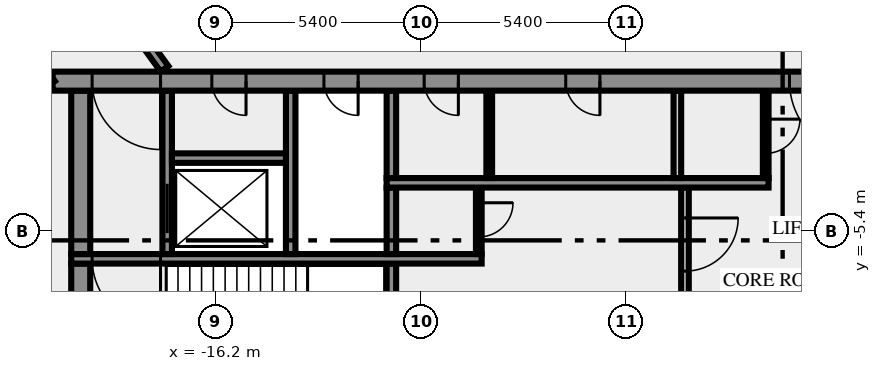
"""IFC4 building model, lengths in metres.
Left out: names, types, materials, properties, quantities, classifications, styles, units other than length and angle.
Written with IfcOpenShell. Run it as: python <this file> out.ifc"""

import sys

from ifc_helpers import new_model, si_unit, direction, frame, frame_2d, origin, place, context, subcontext, project, spatial, rectangle, extrude, element, fill, save


model = new_model("IFC4")
c1 = context("Model", 3, precision=1e-05, world=origin(), true_north=direction((0.0, 1.0)))
c2 = subcontext(c1, "Body", "Model", "MODEL_VIEW")
j1 = project(units=[si_unit("LENGTHUNIT", "METRE"), si_unit("PLANEANGLEUNIT", "RADIAN")], contexts=[c1])
p1 = place(None, origin())
s1 = spatial("IfcSite", under=j1, at=p1, CompositionType="ELEMENT")
p2 = place(p1, origin())
s2 = spatial("IfcBuilding", under=s1, at=p2, CompositionType="ELEMENT")
p3 = place(p2, frame((0.0, 0.0, 194.0)))
s3 = spatial("IfcBuildingStorey", under=s2, at=p3, CompositionType="ELEMENT", Elevation=194.0)
p4 = place(p3, frame((-19.75, -10.5, 0.0), z_axis=(0.0, 0.0, 1.0), x_axis=(0.0, 1.0, 0.0)))
e1 = element("IfcWall", 1, at=p4, inside=s3, PredefinedType="SHEAR", context=c2, shape_type="SweptSolid", body=[
    extrude(rectangle(XDim=4.25, YDim=0.5, at=frame_2d((2.125, 0.0))), origin(), (0.0, 0.0, 1.0), 3.65),
])
p5 = place(p3, frame((-11.575, -7.25, 0.0), z_axis=(0.0, 0.0, 1.0), x_axis=(0.0, 1.0, 0.0)))
e2 = element("IfcWall", 2, at=p5, inside=s3, PredefinedType="SHEAR", context=c2, shape_type="SweptSolid", body=[
    extrude(rectangle(XDim=1.0, YDim=0.25, at=frame_2d((0.5, 0.0))), origin(), (0.0, 0.0, 1.0), 3.65),
])
p6 = place(p3, frame((-3.85, -4.25, 0.0), z_axis=(0.0, 0.0, 1.0), x_axis=(0.0, -1.0, 0.0)))
e3 = element("IfcWall", 3, at=p6, inside=s3, PredefinedType="SOLIDWALL", context=c2, shape_type="SweptSolid", body=[
    extrude(rectangle(XDim=3.0, YDim=0.2, at=frame_2d((1.5, 0.0))), origin(), (0.0, 0.0, 1.0), 3.65),
])
p7 = place(p6, frame((0.8, 0.0, 0.0)))
e4 = element("IfcOpeningElement", 4, at=p7, cuts=e3, PredefinedType="OPENING", context=c2, shape_type="SweptSolid", body=[
    extrude(rectangle(XDim=1.4, YDim=2.1, at=frame_2d((0.7, 1.05))), frame((0.0, 0.11, 0.0), z_axis=(0.0, -1.0, 0.0), x_axis=(1.0, 0.0, 0.0)), (0.0, 0.0, 1.0), 0.22),
])
p8 = place(p3, frame((-9.2, -6.125, 0.0), z_axis=(0.0, 0.0, 1.0), x_axis=(-1.0, 0.0, 0.0)))
e5 = element("IfcWall", 5, at=p8, inside=s3, PredefinedType="SHEAR", context=c2, shape_type="SweptSolid", body=[
    extrude(rectangle(XDim=10.8, YDim=0.25, at=frame_2d((5.4, 0.0))), origin(), (0.0, 0.0, 1.0), 3.65),
])
p9 = place(p8, frame((8.45, 0.0, 0.0)))
e6 = element("IfcOpeningElement", 6, at=p9, cuts=e5, PredefinedType="OPENING", context=c2, shape_type="SweptSolid", body=[
    extrude(rectangle(XDim=1.8, YDim=2.1, at=frame_2d((0.9, 1.05))), frame((0.0, 0.135, 0.0), z_axis=(0.0, -1.0, 0.0), x_axis=(1.0, 0.0, 0.0)), (0.0, 0.0, 1.0), 0.27),
])
p10 = place(p3, frame((-19.75, -6.0, 0.0), z_axis=(0.0, 0.0, 1.0), x_axis=(0.0, 1.0, 0.0)))
e7 = element("IfcWall", 7, at=p10, inside=s3, PredefinedType="SHEAR", context=c2, shape_type="SweptSolid", body=[
    extrude(rectangle(XDim=4.3, YDim=0.5, at=frame_2d((2.15, 0.0))), origin(), (0.0, 0.0, 1.0), 3.65),
])
p11 = place(p3, frame((-17.475, -6.0, 0.0), z_axis=(0.0, 0.0, 1.0), x_axis=(0.0, 1.0, 0.0)))
e8 = element("IfcWall", 8, at=p11, inside=s3, PredefinedType="SHEAR", context=c2, shape_type="SweptSolid", body=[
    extrude(rectangle(XDim=4.3, YDim=0.25, at=frame_2d((2.15, 0.0))), origin(), (0.0, 0.0, 1.0), 3.65),
])
p12 = place(p11, frame((0.55, 0.0, 0.0)))
e9 = element("IfcOpeningElement", 9, at=p12, cuts=e8, PredefinedType="OPENING", context=c2, shape_type="SweptSolid", body=[
    extrude(rectangle(XDim=1.3, YDim=2.1, at=frame_2d((0.65, 1.05))), frame((0.0, 0.135, 0.0), z_axis=(0.0, -1.0, 0.0), x_axis=(1.0, 0.0, 0.0)), (0.0, 0.0, 1.0), 0.27),
])
p13 = place(p3, frame((-14.225, -6.0, 0.0), z_axis=(0.0, 0.0, 1.0), x_axis=(0.0, 1.0, 0.0)))
e10 = element("IfcWall", 10, at=p13, inside=s3, PredefinedType="SHEAR", context=c2, shape_type="SweptSolid", body=[
    extrude(rectangle(XDim=4.3, YDim=0.25, at=frame_2d((2.15, 0.0))), origin(), (0.0, 0.0, 1.0), 3.65),
])
p14 = place(p3, frame((-11.575, -6.0, 0.0), z_axis=(0.0, 0.0, 1.0), x_axis=(0.0, 1.0, 0.0)))
e11 = element("IfcWall", 11, at=p14, inside=s3, PredefinedType="SHEAR", context=c2, shape_type="SweptSolid", body=[
    extrude(rectangle(XDim=1.75, YDim=0.25, at=frame_2d((0.875, 0.0))), origin(), (0.0, 0.0, 1.0), 3.65),
])
p15 = place(p3, frame((-9.275, -4.25, 0.0), z_axis=(0.0, 0.0, 1.0), x_axis=(0.0, -1.0, 0.0)))
e12 = element("IfcWall", 12, at=p15, inside=s3, PredefinedType="PARTITIONING", context=c2, shape_type="SweptSolid", body=[
    extrude(rectangle(XDim=1.75, YDim=0.15, at=frame_2d((0.875, 0.0))), origin(), (0.0, 0.0, 1.0), 3.65),
])
p16 = place(p15, frame((0.4, 0.0, 0.0)))
e13 = element("IfcOpeningElement", 13, at=p16, cuts=e12, PredefinedType="OPENING", context=c2, shape_type="SweptSolid", body=[
    extrude(rectangle(XDim=0.9, YDim=2.1, at=frame_2d((0.45, 1.05))), frame((0.0, 0.085, 0.0), z_axis=(0.0, -1.0, 0.0), x_axis=(1.0, 0.0, 0.0)), (0.0, 0.0, 1.0), 0.17),
])
p17 = place(p3, frame((-11.7, -4.125, 0.0), z_axis=(0.0, 0.0, 1.0), x_axis=(1.0, 0.0, 0.0)))
e14 = element("IfcWall", 14, at=p17, inside=s3, PredefinedType="SHEAR", context=c2, shape_type="SweptSolid", body=[
    extrude(rectangle(XDim=10.05, YDim=0.25, at=frame_2d((5.025, 0.0))), origin(), (0.0, 0.0, 1.0), 3.65),
])
p18 = place(p3, frame((-11.575, -4.0, 0.0), z_axis=(0.0, 0.0, 1.0), x_axis=(0.0, 1.0, 0.0)))
e15 = element("IfcWall", 15, at=p18, inside=s3, PredefinedType="SHEAR", context=c2, shape_type="SweptSolid", body=[
    extrude(rectangle(XDim=2.3, YDim=0.25, at=frame_2d((1.15, 0.0))), origin(), (0.0, 0.0, 1.0), 3.65),
])
p19 = place(p3, frame((-9.0, -4.0, 0.0), z_axis=(0.0, 0.0, 1.0), x_axis=(0.0, 1.0, 0.0)))
e16 = element("IfcWall", 16, at=p19, inside=s3, PredefinedType="PARTITIONING", context=c2, shape_type="SweptSolid", body=[
    extrude(rectangle(XDim=2.3, YDim=0.15, at=frame_2d((1.15, 0.0))), origin(), (0.0, 0.0, 1.0), 3.65),
])
p20 = place(p3, frame((-4.05, -4.0, 0.0), z_axis=(0.0, 0.0, 1.0), x_axis=(0.0, 1.0, 0.0)))
e17 = element("IfcWall", 17, at=p20, inside=s3, PredefinedType="SOLIDWALL", context=c2, shape_type="SweptSolid", body=[
    extrude(rectangle(XDim=2.3, YDim=0.2, at=frame_2d((1.15, 0.0))), origin(), (0.0, 0.0, 1.0), 3.65),
])
p21 = place(p3, frame((-1.725, -1.7, 0.0), z_axis=(0.0, 0.0, 1.0), x_axis=(0.0, -1.0, 0.0)))
e18 = element("IfcWall", 18, at=p21, inside=s3, PredefinedType="PARTITIONING", context=c2, shape_type="SweptSolid", body=[
    extrude(rectangle(XDim=2.3, YDim=0.15, at=frame_2d((1.15, 0.0))), origin(), (0.0, 0.0, 1.0), 3.65),
])
p22 = place(p21, frame((0.75, 0.0, 0.0)))
e19 = element("IfcOpeningElement", 19, at=p22, cuts=e18, PredefinedType="OPENING", context=c2, shape_type="SweptSolid", body=[
    extrude(rectangle(XDim=0.9, YDim=2.1, at=frame_2d((0.45, 1.05))), frame((0.0, 0.085, 0.0), z_axis=(0.0, -1.0, 0.0), x_axis=(1.0, 0.0, 0.0)), (0.0, 0.0, 1.0), 0.17),
])
p23 = place(p3, frame((-17.35, -3.475, 0.0), z_axis=(0.0, 0.0, 1.0), x_axis=(1.0, 0.0, 0.0)))
e20 = element("IfcWall", 20, at=p23, inside=s3, PredefinedType="SHEAR", context=c2, shape_type="SweptSolid", body=[
    extrude(rectangle(XDim=3.0, YDim=0.25, at=frame_2d((1.5, 0.0))), origin(), (0.0, 0.0, 1.0), 3.65),
])
p24 = place(p3, frame((20.49, -1.45, 0.0), z_axis=(0.0, 0.0, 1.0), x_axis=(-1.0, 0.0, 0.0)))
e21 = element("IfcWall", 21, at=p24, inside=s3, PredefinedType="SHEAR", context=c2, shape_type="SweptSolid", body=[
    extrude(rectangle(XDim=40.98, YDim=0.5, at=frame_2d((20.49, 0.0))), origin(), (0.0, 0.0, 1.0), 3.65),
])
p25 = place(p24, frame((38.14, 0.0, 0.0)))
e22 = element("IfcOpeningElement", 22, at=p25, cuts=e21, PredefinedType="OPENING", context=c2, shape_type="SweptSolid", body=[
    extrude(rectangle(XDim=1.8, YDim=2.1, at=frame_2d((0.9, 1.05))), frame((0.0, 0.26, 0.0), z_axis=(0.0, -1.0, 0.0), x_axis=(1.0, 0.0, 0.0)), (0.0, 0.0, 1.0), 0.52),
])
p26 = place(p24, frame((35.89, 0.0, 0.0)))
e23 = element("IfcOpeningElement", 23, at=p26, cuts=e21, PredefinedType="OPENING", context=c2, shape_type="SweptSolid", body=[
    extrude(rectangle(XDim=0.9, YDim=2.1, at=frame_2d((0.45, 1.05))), frame((0.0, 0.26, 0.0), z_axis=(0.0, -1.0, 0.0), x_axis=(1.0, 0.0, 0.0)), (0.0, 0.0, 1.0), 0.52),
])
p27 = place(p24, frame((32.94, 0.0, 0.0)))
e24 = element("IfcOpeningElement", 24, at=p27, cuts=e21, PredefinedType="OPENING", context=c2, shape_type="SweptSolid", body=[
    extrude(rectangle(XDim=0.9, YDim=2.1, at=frame_2d((0.45, 1.05))), frame((0.0, 0.26, 0.0), z_axis=(0.0, -1.0, 0.0), x_axis=(1.0, 0.0, 0.0)), (0.0, 0.0, 1.0), 0.52),
])
p28 = place(p24, frame((30.302, 0.0, 0.0)))
e25 = element("IfcOpeningElement", 25, at=p28, cuts=e21, PredefinedType="OPENING", context=c2, shape_type="SweptSolid", body=[
    extrude(rectangle(XDim=0.9, YDim=2.1, at=frame_2d((0.45, 1.05))), frame((0.0, 0.26, 0.0), z_axis=(0.0, -1.0, 0.0), x_axis=(1.0, 0.0, 0.0)), (0.0, 0.0, 1.0), 0.52),
])
p29 = place(p24, frame((26.577, 0.0, 0.0)))
e26 = element("IfcOpeningElement", 26, at=p29, cuts=e21, PredefinedType="OPENING", context=c2, shape_type="SweptSolid", body=[
    extrude(rectangle(XDim=0.9, YDim=2.1, at=frame_2d((0.45, 1.05))), frame((0.0, 0.26, 0.0), z_axis=(0.0, -1.0, 0.0), x_axis=(1.0, 0.0, 0.0)), (0.0, 0.0, 1.0), 0.52),
])
p30 = place(p24, frame((19.59, 0.0, 0.0)))
e27 = element("IfcOpeningElement", 27, at=p30, cuts=e21, PredefinedType="OPENING", context=c2, shape_type="SweptSolid", body=[
    extrude(rectangle(XDim=2.0, YDim=2.1, at=frame_2d((1.0, 1.05))), frame((0.0, 0.26, 0.0), z_axis=(0.0, -1.0, 0.0), x_axis=(1.0, 0.0, 0.0)), (0.0, 0.0, 1.0), 0.52),
])
p31 = place(p24, frame((7.14, 0.0, 0.0)))
e28 = element("IfcOpeningElement", 28, at=p31, cuts=e21, PredefinedType="OPENING", context=c2, shape_type="SweptSolid", body=[
    extrude(rectangle(XDim=0.9, YDim=2.1, at=frame_2d((0.45, 1.05))), frame((0.0, 0.26, 0.0), z_axis=(0.0, -1.0, 0.0), x_axis=(1.0, 0.0, 0.0)), (0.0, 0.0, 1.0), 0.52),
])
p32 = place(p24, frame((5.028, 0.0, 0.0)))
e29 = element("IfcOpeningElement", 29, at=p32, cuts=e21, PredefinedType="OPENING", context=c2, shape_type="SweptSolid", body=[
    extrude(rectangle(XDim=0.8, YDim=2.1, at=frame_2d((0.4, 1.05))), frame((0.0, 0.26, 0.0), z_axis=(0.0, -1.0, 0.0), x_axis=(1.0, 0.0, 0.0)), (0.0, 0.0, 1.0), 0.52),
])
p33 = place(p24, frame((3.452, 0.0, 0.0)))
e30 = element("IfcOpeningElement", 30, at=p33, cuts=e21, PredefinedType="OPENING", context=c2, shape_type="SweptSolid", body=[
    extrude(rectangle(XDim=0.8, YDim=2.1, at=frame_2d((0.4, 1.05))), frame((0.0, 0.26, 0.0), z_axis=(0.0, -1.0, 0.0), x_axis=(1.0, 0.0, 0.0)), (0.0, 0.0, 1.0), 0.52),
])
p34 = place(p24, frame((1.04, 0.0, 0.0)))
e31 = element("IfcOpeningElement", 31, at=p34, cuts=e21, PredefinedType="OPENING", context=c2, shape_type="SweptSolid", body=[
    extrude(rectangle(XDim=1.8, YDim=2.1, at=frame_2d((0.9, 1.05))), frame((0.0, 0.26, 0.0), z_axis=(0.0, -1.0, 0.0), x_axis=(1.0, 0.0, 0.0)), (0.0, 0.0, 1.0), 0.52),
])
p35 = place(p3, frame((-20.531, -1.523, 0.0), z_axis=(0.0, 0.0, 1.0), x_axis=(-0.587785812891, 0.809016587076, 0.0)))
e32 = element("IfcWall", 32, at=p35, inside=s3, PredefinedType="SOLIDWALL", context=c2, shape_type="SweptSolid", body=[
    extrude(rectangle(XDim=28.67, YDim=0.25, at=frame_2d((14.335, 0.0))), origin(), (0.0, 0.0, 1.0), 3.65),
])
p36 = place(p35, frame((17.015, 0.0, 0.0)))
e33 = element("IfcOpeningElement", 33, at=p36, cuts=e32, PredefinedType="OPENING", context=c2, shape_type="SweptSolid", body=[
    extrude(rectangle(XDim=0.9, YDim=2.1, at=frame_2d((0.45, 1.05))), frame((0.0, 0.135, 0.0), z_axis=(0.0, -1.0, 0.0), x_axis=(1.0, 0.0, 0.0)), (0.0, 0.0, 1.0), 0.27),
])
p37 = place(p35, frame((8.916, 0.0, 0.0)))
e34 = element("IfcOpeningElement", 34, at=p37, cuts=e32, PredefinedType="OPENING", context=c2, shape_type="SweptSolid", body=[
    extrude(rectangle(XDim=0.9, YDim=2.1, at=frame_2d((0.45, 1.05))), frame((0.0, 0.135, 0.0), z_axis=(0.0, -1.0, 0.0), x_axis=(1.0, 0.0, 0.0)), (0.0, 0.0, 1.0), 0.27),
])
p38 = place(p35, frame((18.616, 0.0, 0.0)))
e35 = element("IfcOpeningElement", 35, at=p38, cuts=e32, PredefinedType="OPENING", context=c2, shape_type="SweptSolid", body=[
    extrude(rectangle(XDim=0.9, YDim=2.1, at=frame_2d((0.45, 1.05))), frame((0.0, 0.135, 0.0), z_axis=(0.0, -1.0, 0.0), x_axis=(1.0, 0.0, 0.0)), (0.0, 0.0, 1.0), 0.27),
])
p39 = place(p35, frame((11.615, 0.0, 0.0)))
e36 = element("IfcOpeningElement", 36, at=p39, cuts=e32, PredefinedType="OPENING", context=c2, shape_type="SweptSolid", body=[
    extrude(rectangle(XDim=0.9, YDim=2.1, at=frame_2d((0.45, 1.05))), frame((0.0, 0.135, 0.0), z_axis=(0.0, -1.0, 0.0), x_axis=(1.0, 0.0, 0.0)), (0.0, 0.0, 1.0), 0.27),
])
p40 = place(p3, frame((-35.092, 23.027, 0.0), z_axis=(0.0, 0.0, 1.0), x_axis=(0.587784076945, -0.809017848313, 0.0)))
e37 = element("IfcWall", 37, at=p40, inside=s3, PredefinedType="SOLIDWALL", context=c2, shape_type="SweptSolid", body=[
    extrude(rectangle(XDim=29.853, YDim=0.25, at=frame_2d((14.927, 0.0))), origin(), (0.0, 0.0, 1.0), 3.65),
])
p41 = place(p40, frame((10.095, 0.0, 0.0)))
e38 = element("IfcOpeningElement", 38, at=p41, cuts=e37, PredefinedType="OPENING", context=c2, shape_type="SweptSolid", body=[
    extrude(rectangle(XDim=0.9, YDim=2.1, at=frame_2d((0.45, 1.05))), frame((0.0, 0.135, 0.0), z_axis=(0.0, -1.0, 0.0), x_axis=(1.0, 0.0, 0.0)), (0.0, 0.0, 1.0), 0.27),
])
p42 = place(p40, frame((15.495, 0.0, 0.0)))
e39 = element("IfcOpeningElement", 39, at=p42, cuts=e37, PredefinedType="OPENING", context=c2, shape_type="SweptSolid", body=[
    extrude(rectangle(XDim=0.9, YDim=2.1, at=frame_2d((0.45, 1.05))), frame((0.0, 0.135, 0.0), z_axis=(0.0, -1.0, 0.0), x_axis=(1.0, 0.0, 0.0)), (0.0, 0.0, 1.0), 0.27),
])
p43 = place(p40, frame((0.224, 0.0, 0.0)))
e40 = element("IfcOpeningElement", 40, at=p43, cuts=e37, PredefinedType="OPENING", context=c2, shape_type="SweptSolid", body=[
    extrude(rectangle(XDim=0.9, YDim=2.1, at=frame_2d((0.45, 1.05))), frame((0.0, 0.135, 0.0), z_axis=(0.0, -1.0, 0.0), x_axis=(1.0, 0.0, 0.0)), (0.0, 0.0, 1.0), 0.27),
])
p44 = place(p7, origin())
e41 = element("IfcDoor", 41, at=p44, inside=s3, OperationType="DOUBLE_DOOR_SINGLE_SWING", PredefinedType="DOOR", context=c2, shape_type="SweptSolid", body=[
    extrude(rectangle(XDim=1.4, YDim=2.1, at=frame_2d((0.7, 1.05))), frame((0.0, 0.025, 0.0), z_axis=(0.0, -1.0, 0.0), x_axis=(1.0, 0.0, 0.0)), (0.0, 0.0, 1.0), 0.05),
])
fill(e4, e41)
p45 = place(p9, origin())
e42 = element("IfcDoor", 42, at=p45, inside=s3, OperationType="DOUBLE_DOOR_SINGLE_SWING", PredefinedType="DOOR", context=c2, shape_type="SweptSolid", body=[
    extrude(rectangle(XDim=1.8, YDim=2.1, at=frame_2d((0.9, 1.05))), frame((0.0, 0.025, 0.0), z_axis=(0.0, -1.0, 0.0), x_axis=(1.0, 0.0, 0.0)), (0.0, 0.0, 1.0), 0.05),
])
fill(e6, e42)
p46 = place(p12, origin())
e43 = element("IfcDoor", 43, at=p46, inside=s3, OperationType="DOUBLE_DOOR_SLIDING", PredefinedType="DOOR", context=c2, shape_type="SweptSolid", body=[
    extrude(rectangle(XDim=1.3, YDim=2.1, at=frame_2d((0.65, 1.05))), frame((0.0, 0.025, 0.0), z_axis=(0.0, -1.0, 0.0), x_axis=(1.0, 0.0, 0.0)), (0.0, 0.0, 1.0), 0.05),
])
fill(e9, e43)
p47 = place(p16, origin())
e44 = element("IfcDoor", 44, at=p47, inside=s3, OperationType="SINGLE_SWING_LEFT", PredefinedType="DOOR", context=c2, shape_type="SweptSolid", body=[
    extrude(rectangle(XDim=0.9, YDim=2.1, at=frame_2d((0.45, 1.05))), frame((0.0, 0.025, 0.0), z_axis=(0.0, -1.0, 0.0), x_axis=(1.0, 0.0, 0.0)), (0.0, 0.0, 1.0), 0.05),
])
fill(e13, e44)
p48 = place(p22, origin())
e45 = element("IfcDoor", 45, at=p48, inside=s3, OperationType="SINGLE_SWING_RIGHT", PredefinedType="DOOR", context=c2, shape_type="SweptSolid", body=[
    extrude(rectangle(XDim=0.9, YDim=2.1, at=frame_2d((0.45, 1.05))), frame((0.0, 0.025, 0.0), z_axis=(0.0, -1.0, 0.0), x_axis=(1.0, 0.0, 0.0)), (0.0, 0.0, 1.0), 0.05),
])
fill(e19, e45)
p49 = place(p25, origin())
e46 = element("IfcDoor", 46, at=p49, inside=s3, OperationType="DOUBLE_DOOR_SINGLE_SWING", PredefinedType="DOOR", context=c2, shape_type="SweptSolid", body=[
    extrude(rectangle(XDim=1.8, YDim=2.1, at=frame_2d((0.9, 1.05))), frame((0.0, 0.025, 0.0), z_axis=(0.0, -1.0, 0.0), x_axis=(1.0, 0.0, 0.0)), (0.0, 0.0, 1.0), 0.05),
])
fill(e22, e46)
p50 = place(p26, origin())
e47 = element("IfcDoor", 47, at=p50, inside=s3, OperationType="SINGLE_SWING_RIGHT", PredefinedType="DOOR", context=c2, shape_type="SweptSolid", body=[
    extrude(rectangle(XDim=0.9, YDim=2.1, at=frame_2d((0.45, 1.05))), frame((0.0, 0.025, 0.0), z_axis=(0.0, -1.0, 0.0), x_axis=(1.0, 0.0, 0.0)), (0.0, 0.0, 1.0), 0.05),
])
fill(e23, e47)
p51 = place(p27, origin())
e48 = element("IfcDoor", 48, at=p51, inside=s3, OperationType="SINGLE_SWING_RIGHT", PredefinedType="DOOR", context=c2, shape_type="SweptSolid", body=[
    extrude(rectangle(XDim=0.9, YDim=2.1, at=frame_2d((0.45, 1.05))), frame((0.0, 0.025, 0.0), z_axis=(0.0, -1.0, 0.0), x_axis=(1.0, 0.0, 0.0)), (0.0, 0.0, 1.0), 0.05),
])
fill(e24, e48)
p52 = place(p28, origin())
e49 = element("IfcDoor", 49, at=p52, inside=s3, OperationType="SINGLE_SWING_RIGHT", PredefinedType="DOOR", context=c2, shape_type="SweptSolid", body=[
    extrude(rectangle(XDim=0.9, YDim=2.1, at=frame_2d((0.45, 1.05))), frame((0.0, 0.025, 0.0), z_axis=(0.0, -1.0, 0.0), x_axis=(1.0, 0.0, 0.0)), (0.0, 0.0, 1.0), 0.05),
])
fill(e25, e49)
p53 = place(p29, origin())
e50 = element("IfcDoor", 50, at=p53, inside=s3, OperationType="SINGLE_SWING_RIGHT", PredefinedType="DOOR", context=c2, shape_type="SweptSolid", body=[
    extrude(rectangle(XDim=0.9, YDim=2.1, at=frame_2d((0.45, 1.05))), frame((0.0, 0.025, 0.0), z_axis=(0.0, -1.0, 0.0), x_axis=(1.0, 0.0, 0.0)), (0.0, 0.0, 1.0), 0.05),
])
fill(e26, e50)
p54 = place(p30, origin())
e51 = element("IfcDoor", 51, at=p54, inside=s3, OperationType="DOUBLE_DOOR_SINGLE_SWING", PredefinedType="DOOR", context=c2, shape_type="SweptSolid", body=[
    extrude(rectangle(XDim=2.0, YDim=2.1, at=frame_2d((1.0, 1.05))), frame((0.0, 0.025, 0.0), z_axis=(0.0, -1.0, 0.0), x_axis=(1.0, 0.0, 0.0)), (0.0, 0.0, 1.0), 0.05),
])
fill(e27, e51)
save(model, sys.argv[1])
